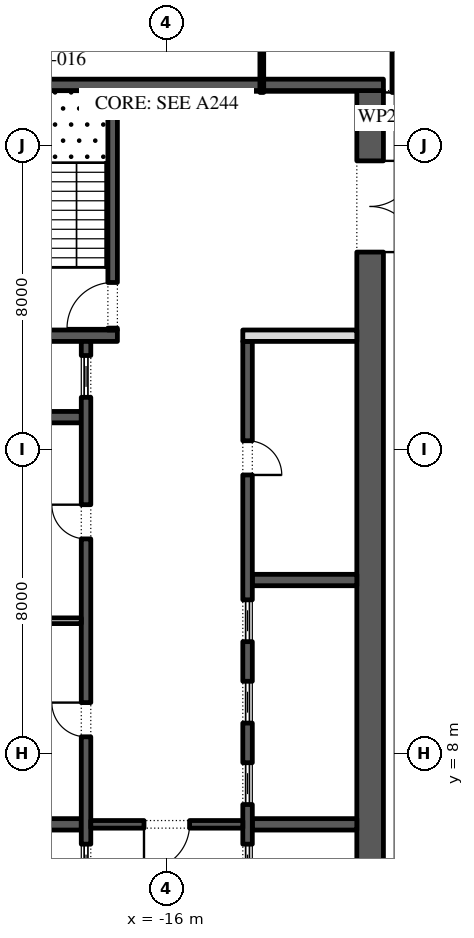
"""IFC4 building model, lengths in metres.
Left out: names, types, materials, properties, quantities, classifications, styles, units other than length and angle.
Written with IfcOpenShell. Run it as: python <this file> out.ifc"""

import sys

from ifc_helpers import new_model, si_unit, direction, frame, frame_2d, origin, place, context, subcontext, project, spatial, rectangle, extrude, element, fill, save


model = new_model("IFC4")
c1 = context("Model", 3, precision=1e-05, world=origin(), true_north=direction((0.0, 1.0)))
c2 = subcontext(c1, "Body", "Model", "MODEL_VIEW")
j1 = project(units=[si_unit("LENGTHUNIT", "METRE"), si_unit("PLANEANGLEUNIT", "RADIAN")], contexts=[c1])
p1 = place(None, origin())
s1 = spatial("IfcSite", under=j1, at=p1, CompositionType="ELEMENT")
p2 = place(p1, origin())
s2 = spatial("IfcBuilding", under=s1, at=p2, CompositionType="ELEMENT")
p3 = place(p2, frame((0.0, 0.0, 188.4)))
s3 = spatial("IfcBuildingStorey", under=s2, at=p3, CompositionType="ELEMENT", Elevation=188.4)
p4 = place(p3, frame((-10.65, -2.45, 0.0), z_axis=(0.0, 0.0, 1.0), x_axis=(0.0, 1.0, 0.0)))
e1 = element("IfcWall", 1, at=p4, inside=s3, PredefinedType="SHEAR", context=c2, shape_type="SweptSolid", body=[
    extrude(rectangle(XDim=27.9, YDim=0.7, at=frame_2d((13.95, 0.0))), origin(), (0.0, 0.0, 1.0), 4.0),
])
p5 = place(p4, frame((23.65, 0.0, 0.0)))
e2 = element("IfcOpeningElement", 2, at=p5, cuts=e1, PredefinedType="OPENING", context=c2, shape_type="SweptSolid", body=[
    extrude(rectangle(XDim=2.4, YDim=2.1, at=frame_2d((1.2, 1.05))), frame((0.0, 0.36, 0.0), z_axis=(0.0, -1.0, 0.0), x_axis=(1.0, 0.0, 0.0)), (0.0, 0.0, 1.0), 0.72),
])
p6 = place(p4, frame((0.788, 0.0, 0.0)))
e3 = element("IfcOpeningElement", 3, at=p6, cuts=e1, PredefinedType="OPENING", context=c2, shape_type="SweptSolid", body=[
    extrude(rectangle(XDim=0.9, YDim=2.1, at=frame_2d((0.45, 1.05))), frame((0.0, 0.36, 0.0), z_axis=(0.0, -1.0, 0.0), x_axis=(1.0, 0.0, 0.0)), (0.0, 0.0, 1.0), 0.72),
])
p7 = place(p4, frame((3.962, 0.0, 0.0)))
e4 = element("IfcOpeningElement", 4, at=p7, cuts=e1, PredefinedType="OPENING", context=c2, shape_type="SweptSolid", body=[
    extrude(rectangle(XDim=1.0, YDim=2.1, at=frame_2d((0.5, 1.05))), frame((0.0, 0.36, 0.0), z_axis=(0.0, -1.0, 0.0), x_axis=(1.0, 0.0, 0.0)), (0.0, 0.0, 1.0), 0.72),
])
p8 = place(p3, frame((-21.7, 25.6, 0.0), z_axis=(0.0, 0.0, 1.0), x_axis=(1.0, 0.0, 0.0)))
e5 = element("IfcWall", 5, at=p8, inside=s3, PredefinedType="SHEAR", context=c2, shape_type="SweptSolid", body=[
    extrude(rectangle(XDim=11.4, YDim=0.3, at=frame_2d((5.7, 0.0))), origin(), (0.0, 0.0, 1.0), 4.0),
])
p9 = place(p3, frame((-21.0, 19.0, 0.0), z_axis=(0.0, 0.0, 1.0), x_axis=(1.0, 0.0, 0.0)))
e6 = element("IfcWall", 6, at=p9, inside=s3, PredefinedType="SHEAR", context=c2, shape_type="SweptSolid", body=[
    extrude(rectangle(XDim=3.7, YDim=0.3, at=frame_2d((1.85, 0.0))), origin(), (0.0, 0.0, 1.0), 4.0),
])
p10 = place(p3, frame((-17.425, 19.15, 0.0), z_axis=(0.0, 0.0, 1.0), x_axis=(0.0, 1.0, 0.0)))
e7 = element("IfcWall", 7, at=p10, inside=s3, PredefinedType="SHEAR", context=c2, shape_type="SweptSolid", body=[
    extrude(rectangle(XDim=6.3, YDim=0.25, at=frame_2d((3.15, 0.0))), origin(), (0.0, 0.0, 1.0), 4.0),
])
p11 = place(p10, frame((0.05, 0.0, 0.0)))
e8 = element("IfcOpeningElement", 8, at=p11, cuts=e7, PredefinedType="OPENING", context=c2, shape_type="SweptSolid", body=[
    extrude(rectangle(XDim=1.2, YDim=2.1, at=frame_2d((0.6, 1.05))), frame((0.0, 0.135, 0.0), z_axis=(0.0, -1.0, 0.0), x_axis=(1.0, 0.0, 0.0)), (0.0, 0.0, 1.0), 0.27),
])
for number, where, z_axis, x_axis in (
    (9, (-21.0, 6.143, 0.0), (0.0, 0.0, 1.0), (1.0, 0.0, 0.0)),
    (10, (-21.0, 16.857, 0.0), (0.0, 0.0, 1.0), (1.0, 0.0, 0.0)),
):
    element("IfcWall", number, at=place(p3, frame(where, z_axis=z_axis, x_axis=x_axis)), inside=s3, PredefinedType="SHEAR", context=c2, shape_type="SweptSolid", body=[
        extrude(rectangle(XDim=2.75, YDim=0.3, at=frame_2d((1.375, 0.0))), origin(), (0.0, 0.0, 1.0), 4.0),
    ])
p12 = place(p3, frame((-18.125, 4.15, 0.0), z_axis=(0.0, 0.0, 1.0), x_axis=(0.0, 1.0, 0.0)))
e11 = element("IfcWall", 11, at=p12, inside=s3, PredefinedType="SHEAR", context=c2, shape_type="SweptSolid", body=[
    extrude(rectangle(XDim=14.7, YDim=0.25, at=frame_2d((7.35, 0.0))), origin(), (0.0, 0.0, 1.0), 4.0),
])
p13 = place(p12, frame((4.296, 0.0, 0.0)))
e12 = element("IfcOpeningElement", 12, at=p13, cuts=e11, PredefinedType="OPENING", context=c2, shape_type="SweptSolid", body=[
    extrude(rectangle(XDim=0.9, YDim=2.1, at=frame_2d((0.45, 1.05))), frame((0.0, 0.135, 0.0), z_axis=(0.0, -1.0, 0.0), x_axis=(1.0, 0.0, 0.0)), (0.0, 0.0, 1.0), 0.27),
])
p14 = place(p12, frame((9.504, 0.0, 0.0)))
e13 = element("IfcOpeningElement", 13, at=p14, cuts=e11, PredefinedType="OPENING", context=c2, shape_type="SweptSolid", body=[
    extrude(rectangle(XDim=0.9, YDim=2.1, at=frame_2d((0.45, 1.05))), frame((0.0, 0.135, 0.0), z_axis=(0.0, -1.0, 0.0), x_axis=(1.0, 0.0, 0.0)), (0.0, 0.0, 1.0), 0.27),
])
p15 = place(p12, frame((0.371, 0.0, 0.0)))
e14 = element("IfcOpeningElement", 14, at=p15, cuts=e11, PredefinedType="OPENING", context=c2, shape_type="SweptSolid", body=[
    extrude(rectangle(XDim=1.1, YDim=2.1, at=frame_2d((0.55, 1.05))), frame((0.0, 0.135, 0.0), z_axis=(0.0, -1.0, 0.0), x_axis=(1.0, 0.0, 0.0)), (0.0, 0.0, 1.0), 0.27),
])
p16 = place(p12, frame((13.229, 0.0, 0.0)))
e15 = element("IfcOpeningElement", 15, at=p16, cuts=e11, PredefinedType="OPENING", context=c2, shape_type="SweptSolid", body=[
    extrude(rectangle(XDim=1.1, YDim=2.1, at=frame_2d((0.55, 1.05))), frame((0.0, 0.135, 0.0), z_axis=(0.0, -1.0, 0.0), x_axis=(1.0, 0.0, 0.0)), (0.0, 0.0, 1.0), 0.27),
])
p17 = place(p3, frame((-21.0, 11.5, 0.0), z_axis=(0.0, 0.0, 1.0), x_axis=(1.0, 0.0, 0.0)))
e16 = element("IfcWall", 16, at=p17, inside=s3, PredefinedType="PARTITIONING", context=c2, shape_type="SweptSolid", body=[
    extrude(rectangle(XDim=2.75, YDim=0.15, at=frame_2d((1.375, 0.0))), origin(), (0.0, 0.0, 1.0), 4.0),
])
for number, where, z_axis, x_axis in (
    (17, (-13.75, 6.143, 0.0), (0.0, 0.0, 1.0), (1.0, 0.0, 0.0)),
    (18, (-13.75, 12.571, 0.0), (0.0, 0.0, 1.0), (1.0, 0.0, 0.0)),
):
    element("IfcWall", number, at=place(p3, frame(where, z_axis=z_axis, x_axis=x_axis)), inside=s3, PredefinedType="SHEAR", context=c2, shape_type="SweptSolid", body=[
        extrude(rectangle(XDim=2.75, YDim=0.3, at=frame_2d((1.375, 0.0))), origin(), (0.0, 0.0, 1.0), 4.0),
    ])
p18 = place(p3, frame((-13.875, -2.45, 0.0), z_axis=(0.0, 0.0, 1.0), x_axis=(0.0, 1.0, 0.0)))
e19 = element("IfcWall", 19, at=p18, inside=s3, PredefinedType="SHEAR", context=c2, shape_type="SweptSolid", body=[
    extrude(rectangle(XDim=21.3, YDim=0.25, at=frame_2d((10.65, 0.0))), origin(), (0.0, 0.0, 1.0), 4.0),
])
p19 = place(p18, frame((17.786, 0.0, 0.0)))
e20 = element("IfcOpeningElement", 20, at=p19, cuts=e19, PredefinedType="OPENING", context=c2, shape_type="SweptSolid", body=[
    extrude(rectangle(XDim=0.9, YDim=2.1, at=frame_2d((0.45, 1.05))), frame((0.0, 0.135, 0.0), z_axis=(0.0, -1.0, 0.0), x_axis=(1.0, 0.0, 0.0)), (0.0, 0.0, 1.0), 0.27),
])
p20 = place(p18, frame((6.971, 0.0, 0.0)))
e21 = element("IfcOpeningElement", 21, at=p20, cuts=e19, PredefinedType="OPENING", context=c2, shape_type="SweptSolid", body=[
    extrude(rectangle(XDim=1.1, YDim=2.1, at=frame_2d((0.55, 1.05))), frame((0.0, 0.135, 0.0), z_axis=(0.0, -1.0, 0.0), x_axis=(1.0, 0.0, 0.0)), (0.0, 0.0, 1.0), 0.27),
])
p21 = place(p18, frame((9.114, 0.0, 0.0)))
e22 = element("IfcOpeningElement", 22, at=p21, cuts=e19, PredefinedType="OPENING", context=c2, shape_type="SweptSolid", body=[
    extrude(rectangle(XDim=1.1, YDim=2.1, at=frame_2d((0.55, 1.05))), frame((0.0, 0.135, 0.0), z_axis=(0.0, -1.0, 0.0), x_axis=(1.0, 0.0, 0.0)), (0.0, 0.0, 1.0), 0.27),
])
p22 = place(p18, frame((11.257, 0.0, 0.0)))
e23 = element("IfcOpeningElement", 23, at=p22, cuts=e19, PredefinedType="OPENING", context=c2, shape_type="SweptSolid", body=[
    extrude(rectangle(XDim=1.1, YDim=2.1, at=frame_2d((0.55, 1.05))), frame((0.0, 0.135, 0.0), z_axis=(0.0, -1.0, 0.0), x_axis=(1.0, 0.0, 0.0)), (0.0, 0.0, 1.0), 0.27),
])
p23 = place(p18, frame((13.4, 0.0, 0.0)))
e24 = element("IfcOpeningElement", 24, at=p23, cuts=e19, PredefinedType="OPENING", context=c2, shape_type="SweptSolid", body=[
    extrude(rectangle(XDim=1.1, YDim=2.1, at=frame_2d((0.55, 1.05))), frame((0.0, 0.135, 0.0), z_axis=(0.0, -1.0, 0.0), x_axis=(1.0, 0.0, 0.0)), (0.0, 0.0, 1.0), 0.27),
])
p24 = place(p3, frame((-14.0, 19.0, 0.0), z_axis=(0.0, 0.0, 1.0), x_axis=(1.0, 0.0, 0.0)))
e25 = element("IfcWall", 25, at=p24, inside=s3, PredefinedType="PARTITIONING", context=c2, shape_type="SweptSolid", body=[
    extrude(rectangle(XDim=3.0, YDim=0.3, at=frame_2d((1.5, 0.0))), origin(), (0.0, 0.0, 1.0), 4.0),
])
p25 = place(p3, frame((-18.0, 6.143, 0.0), z_axis=(0.0, 0.0, 1.0), x_axis=(1.0, 0.0, 0.0)))
e26 = element("IfcWall", 26, at=p25, inside=s3, PredefinedType="SHEAR", context=c2, shape_type="SweptSolid", body=[
    extrude(rectangle(XDim=4.0, YDim=0.2, at=frame_2d((2.0, 0.0))), origin(), (0.0, 0.0, 1.0), 4.0),
])
p26 = place(p25, frame((1.4, 0.0, 0.0)))
e27 = element("IfcOpeningElement", 27, at=p26, cuts=e26, PredefinedType="OPENING", context=c2, shape_type="SweptSolid", body=[
    extrude(rectangle(XDim=1.2, YDim=2.1, at=frame_2d((0.6, 1.05))), frame((0.0, 0.11, 0.0), z_axis=(0.0, -1.0, 0.0), x_axis=(1.0, 0.0, 0.0)), (0.0, 0.0, 1.0), 0.22),
])
p27 = place(p3, frame((-13.5, 30.37, 0.0), z_axis=(0.0, 0.0, 1.0), x_axis=(0.0, -1.0, 0.0)))
e28 = element("IfcWall", 28, at=p27, inside=s3, PredefinedType="PARTITIONING", context=c2, shape_type="SweptSolid", body=[
    extrude(rectangle(XDim=4.97, YDim=0.1, at=frame_2d((2.485, 0.0))), origin(), (0.0, 0.0, 1.0), 4.0),
])
p28 = place(p3, frame((-10.0, 25.4, 0.0), z_axis=(0.0, 0.0, 1.0), x_axis=(0.0, 1.0, 0.0)))
e29 = element("IfcWall", 29, at=p28, inside=s3, PredefinedType="PARTITIONING", context=c2, shape_type="SweptSolid", body=[
    extrude(rectangle(XDim=1.875, YDim=0.15, at=frame_2d((0.938, 0.0))), origin(), (0.0, 0.0, 1.0), 4.0),
])
p29 = place(p13, origin())
e30 = element("IfcDoor", 30, at=p29, inside=s3, OperationType="SINGLE_SWING_LEFT", PredefinedType="DOOR", context=c2, shape_type="SweptSolid", body=[
    extrude(rectangle(XDim=0.9, YDim=2.1, at=frame_2d((0.45, 1.05))), frame((0.0, 0.125, 0.0), z_axis=(0.0, -1.0, 0.0), x_axis=(1.0, 0.0, 0.0)), (0.0, 0.0, 1.0), 0.05),
])
fill(e12, e30)
p30 = place(p14, origin())
e31 = element("IfcDoor", 31, at=p30, inside=s3, OperationType="SINGLE_SWING_LEFT", PredefinedType="DOOR", context=c2, shape_type="SweptSolid", body=[
    extrude(rectangle(XDim=0.9, YDim=2.1, at=frame_2d((0.45, 1.05))), frame((0.0, 0.125, 0.0), z_axis=(0.0, -1.0, 0.0), x_axis=(1.0, 0.0, 0.0)), (0.0, 0.0, 1.0), 0.05),
])
fill(e13, e31)
p31 = place(p15, origin())
e32 = element("IfcDoor", 32, at=p31, inside=s3, OperationType="SLIDING_TO_LEFT", PredefinedType="DOOR", context=c2, shape_type="SweptSolid", body=[
    extrude(rectangle(XDim=1.1, YDim=2.1, at=frame_2d((0.55, 1.05))), frame((0.0, 0.025, 0.0), z_axis=(0.0, -1.0, 0.0), x_axis=(1.0, 0.0, 0.0)), (0.0, 0.0, 1.0), 0.05),
])
fill(e14, e32)
p32 = place(p16, origin())
e33 = element("IfcDoor", 33, at=p32, inside=s3, OperationType="SLIDING_TO_LEFT", PredefinedType="DOOR", context=c2, shape_type="SweptSolid", body=[
    extrude(rectangle(XDim=1.1, YDim=2.1, at=frame_2d((0.55, 1.05))), frame((0.0, 0.025, 0.0), z_axis=(0.0, -1.0, 0.0), x_axis=(1.0, 0.0, 0.0)), (0.0, 0.0, 1.0), 0.05),
])
fill(e15, e33)
p33 = place(p19, frame((0.9, -0.2, 0.0), z_axis=(0.0, 0.0, 1.0), x_axis=(-1.0, 0.0, 0.0)))
e34 = element("IfcDoor", 34, at=p33, inside=s3, OperationType="SINGLE_SWING_LEFT", PredefinedType="DOOR", context=c2, shape_type="SweptSolid", body=[
    extrude(rectangle(XDim=0.9, YDim=2.1, at=frame_2d((0.45, 1.05))), frame((0.0, -0.075, 0.0), z_axis=(0.0, -1.0, 0.0), x_axis=(1.0, 0.0, 0.0)), (0.0, 0.0, 1.0), 0.05),
])
fill(e20, e34)
p34 = place(p20, origin())
e35 = element("IfcDoor", 35, at=p34, inside=s3, OperationType="SLIDING_TO_LEFT", PredefinedType="DOOR", context=c2, shape_type="SweptSolid", body=[
    extrude(rectangle(XDim=1.1, YDim=2.1, at=frame_2d((0.55, 1.05))), frame((0.0, 0.025, 0.0), z_axis=(0.0, -1.0, 0.0), x_axis=(1.0, 0.0, 0.0)), (0.0, 0.0, 1.0), 0.05),
])
fill(e21, e35)
p35 = place(p21, origin())
e36 = element("IfcDoor", 36, at=p35, inside=s3, OperationType="SLIDING_TO_LEFT", PredefinedType="DOOR", context=c2, shape_type="SweptSolid", body=[
    extrude(rectangle(XDim=1.1, YDim=2.1, at=frame_2d((0.55, 1.05))), frame((0.0, 0.025, 0.0), z_axis=(0.0, -1.0, 0.0), x_axis=(1.0, 0.0, 0.0)), (0.0, 0.0, 1.0), 0.05),
])
fill(e22, e36)
p36 = place(p22, origin())
e37 = element("IfcDoor", 37, at=p36, inside=s3, OperationType="SLIDING_TO_LEFT", PredefinedType="DOOR", context=c2, shape_type="SweptSolid", body=[
    extrude(rectangle(XDim=1.1, YDim=2.1, at=frame_2d((0.55, 1.05))), frame((0.0, 0.025, 0.0), z_axis=(0.0, -1.0, 0.0), x_axis=(1.0, 0.0, 0.0)), (0.0, 0.0, 1.0), 0.05),
])
fill(e23, e37)
p37 = place(p23, origin())
e38 = element("IfcDoor", 38, at=p37, inside=s3, OperationType="SLIDING_TO_LEFT", PredefinedType="DOOR", context=c2, shape_type="SweptSolid", body=[
    extrude(rectangle(XDim=1.1, YDim=2.1, at=frame_2d((0.55, 1.05))), frame((0.0, 0.025, 0.0), z_axis=(0.0, -1.0, 0.0), x_axis=(1.0, 0.0, 0.0)), (0.0, 0.0, 1.0), 0.05),
])
fill(e24, e38)
p38 = place(p26, frame((1.2, 0.0, 0.0), z_axis=(0.0, 0.0, 1.0), x_axis=(-1.0, 0.0, 0.0)))
e39 = element("IfcDoor", 39, at=p38, inside=s3, OperationType="SINGLE_SWING_LEFT", PredefinedType="DOOR", context=c2, shape_type="SweptSolid", body=[
    extrude(rectangle(XDim=1.2, YDim=2.1, at=frame_2d((0.6, 1.05))), frame((0.0, 0.025, 0.0), z_axis=(0.0, -1.0, 0.0), x_axis=(1.0, 0.0, 0.0)), (0.0, 0.0, 1.0), 0.05),
])
fill(e27, e39)
p39 = place(p5, frame((2.4, 0.0, 0.0), z_axis=(0.0, 0.0, 1.0), x_axis=(-1.0, 0.0, 0.0)))
e40 = element("IfcDoor", 40, at=p39, inside=s3, OperationType="DOUBLE_DOOR_SINGLE_SWING", PredefinedType="DOOR", context=c2, shape_type="SweptSolid", body=[
    extrude(rectangle(XDim=2.4, YDim=2.1, at=frame_2d((1.2, 1.05))), frame((0.0, 0.025, 0.0), z_axis=(0.0, -1.0, 0.0), x_axis=(1.0, 0.0, 0.0)), (0.0, 0.0, 1.0), 0.05),
])
fill(e2, e40)
p40 = place(p11, origin())
e41 = element("IfcDoor", 41, at=p40, inside=s3, OperationType="SINGLE_SWING_RIGHT", PredefinedType="DOOR", context=c2, shape_type="SweptSolid", body=[
    extrude(rectangle(XDim=1.2, YDim=2.1, at=frame_2d((0.6, 1.05))), frame((0.0, 0.025, 0.0), z_axis=(0.0, -1.0, 0.0), x_axis=(1.0, 0.0, 0.0)), (0.0, 0.0, 1.0), 0.05),
])
fill(e8, e41)
save(model, sys.argv[1])
